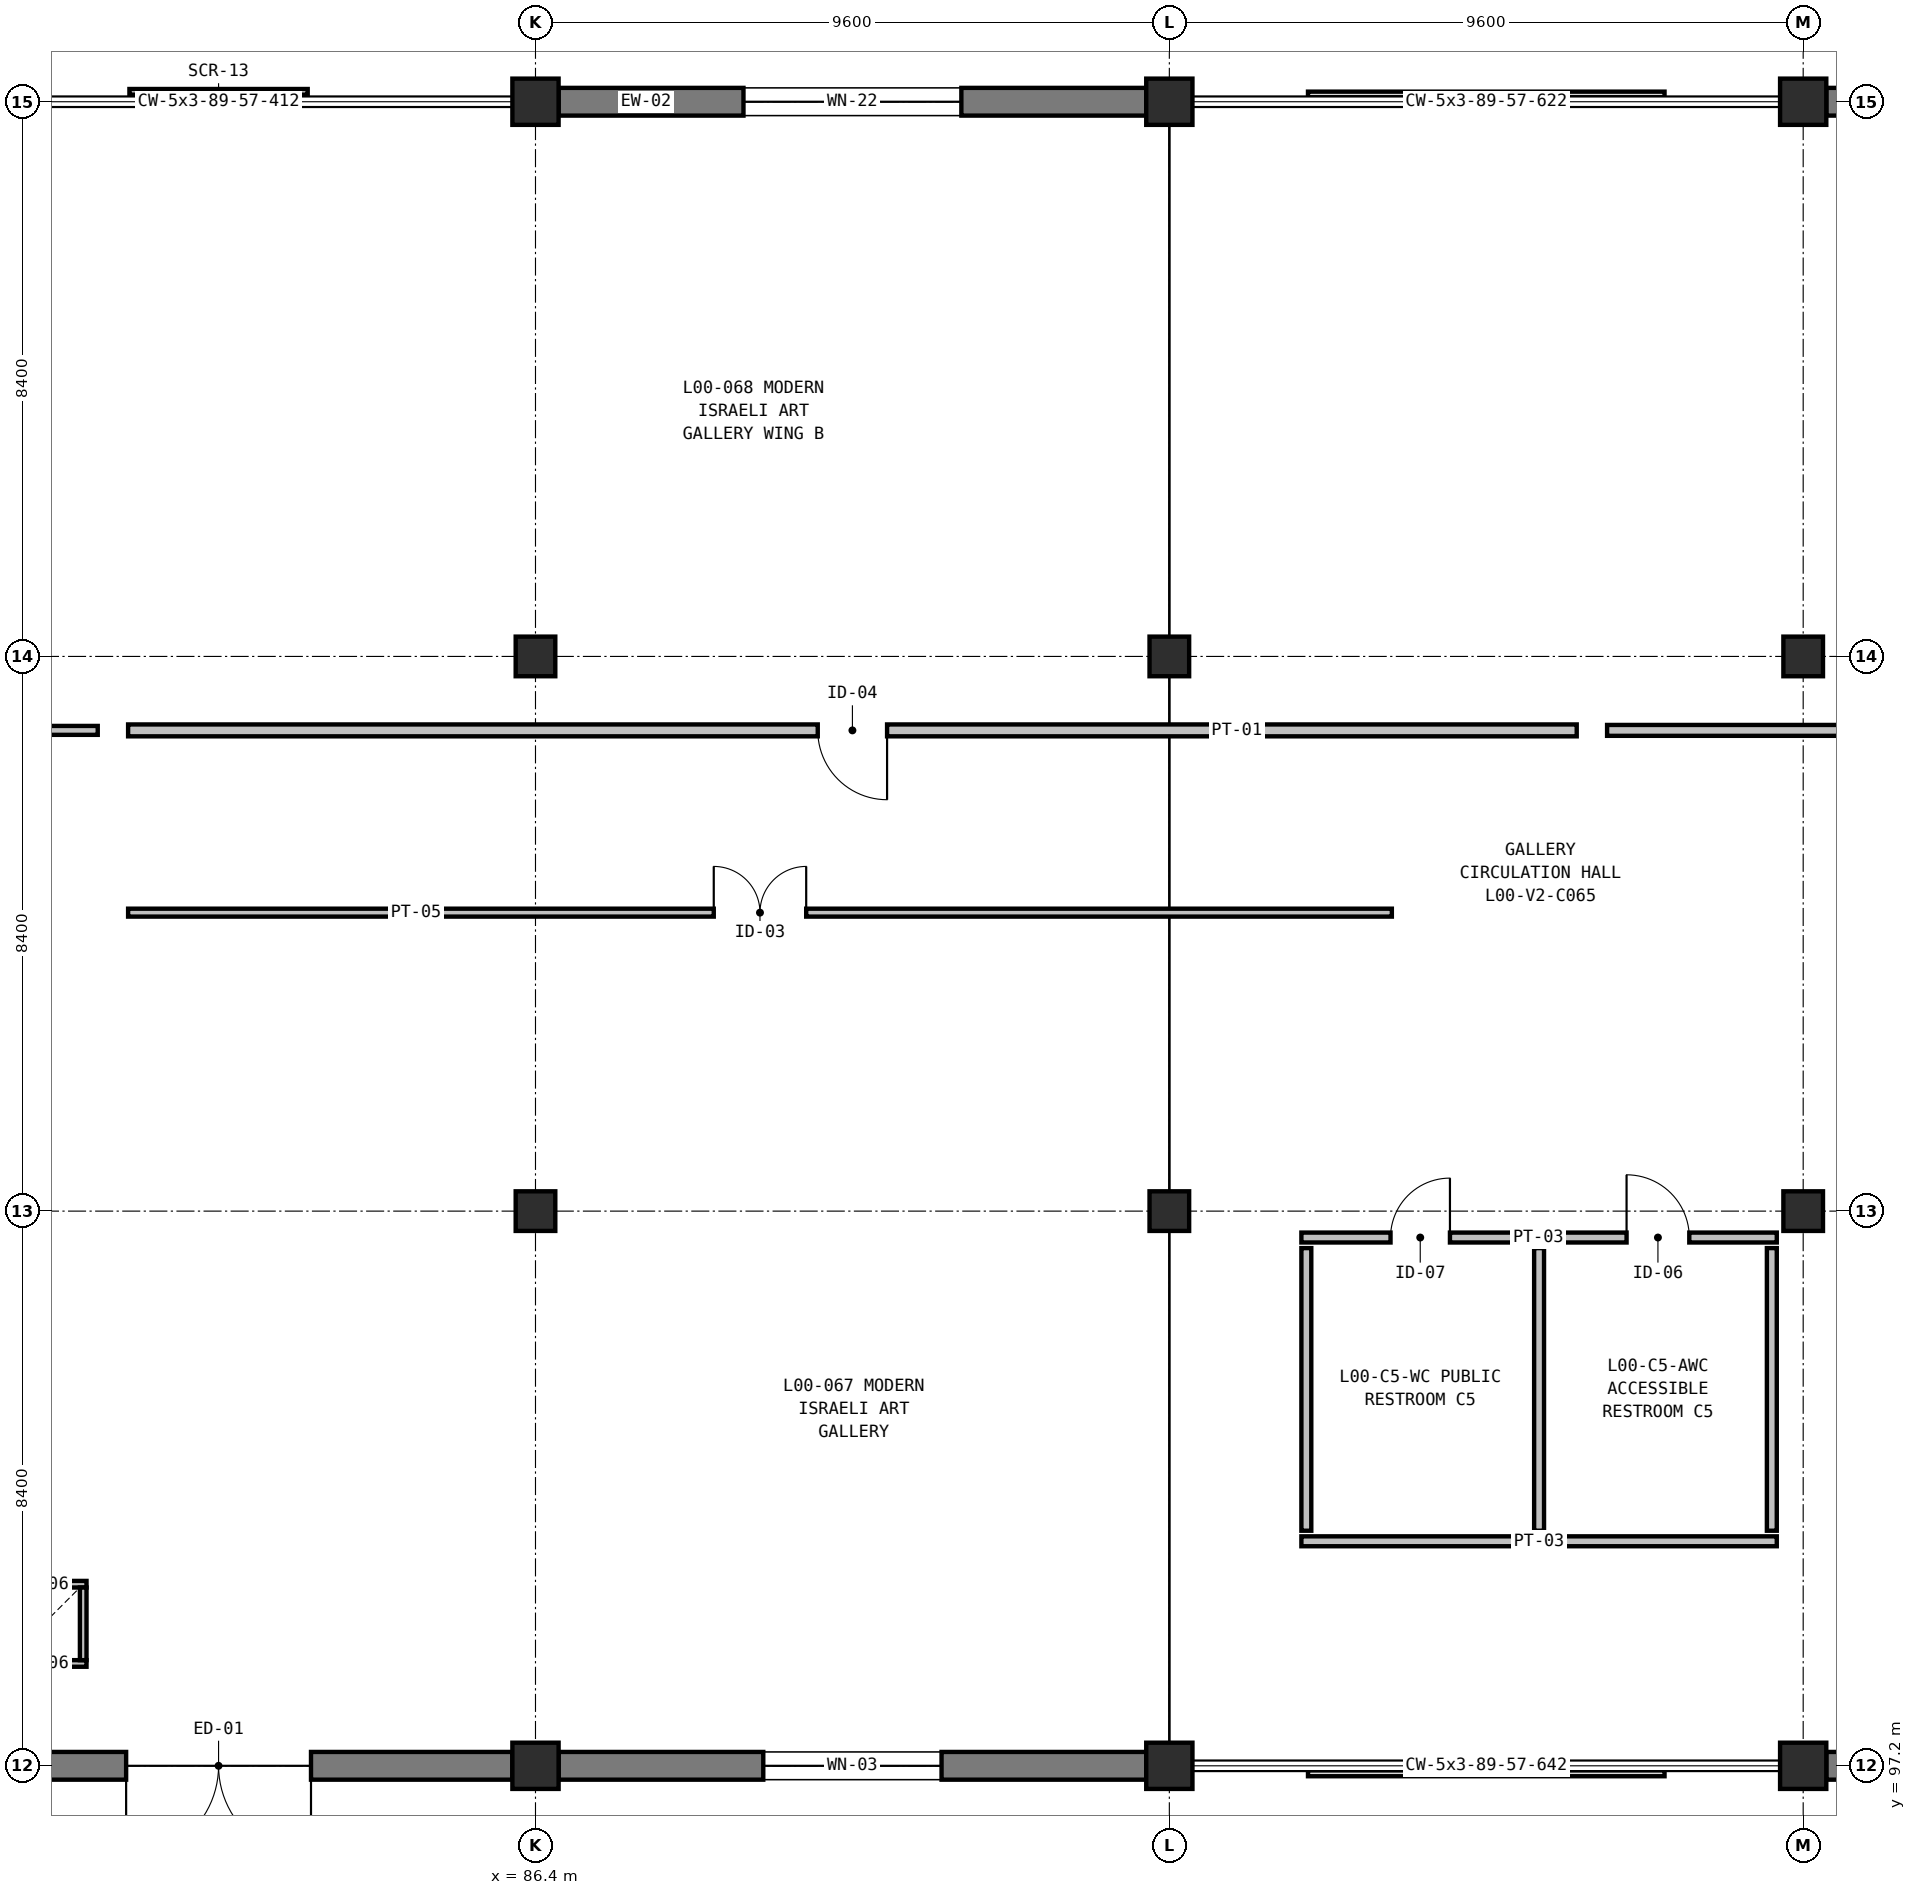
"""IFC4 building model, lengths in metres.
Left out: names, types, materials, properties, quantities, classifications, styles, units other than length and angle.
Written with IfcOpenShell. Run it as: python <this file> out.ifc"""

import sys

from ifc_helpers import new_model, si_unit, direction, frame, frame_2d, origin, origin_2d, place, context, subcontext, project, spatial, rectangle, extrude, element, fill, save


model = new_model("IFC4")
c1 = context("Model", 3, precision=1e-05, world=origin(), true_north=direction((0.0, 1.0)))
c2 = subcontext(c1, "Body", "Model", "MODEL_VIEW")
j1 = project(units=[si_unit("LENGTHUNIT", "METRE"), si_unit("PLANEANGLEUNIT", "RADIAN")], contexts=[c1])
p1 = place(None, origin())
s1 = spatial("IfcSite", under=j1, at=p1, CompositionType="ELEMENT")
p2 = place(p1, origin())
s2 = spatial("IfcBuilding", under=s1, at=p2, CompositionType="ELEMENT")
p3 = place(p2, origin())
s3 = spatial("IfcBuildingStorey", under=s2, at=p3, CompositionType="ELEMENT", Elevation=0.0)
p4 = place(p3, frame((86.4, 97.2, 0.0), z_axis=(0.0, 0.0, 1.0), x_axis=(1.0, 0.0, 0.0)))
e1 = element("IfcColumn", 1, at=p4, inside=s3, PredefinedType="COLUMN", context=c2, shape_type="SweptSolid", body=[
    extrude(rectangle(XDim=0.7, YDim=0.7, at=origin_2d()), origin(), (0.0, 0.0, 1.0), 6.0),
])
for number, where, z_axis, x_axis in (
    (2, (86.4, 105.6, 0.0), (0.0, 0.0, 1.0), (1.0, 0.0, 0.0)),
    (3, (86.4, 114.0, 0.0), (0.0, 0.0, 1.0), (1.0, 0.0, 0.0)),
):
    element("IfcColumn", number, at=place(p3, frame(where, z_axis=z_axis, x_axis=x_axis)), inside=s3, PredefinedType="COLUMN", context=c2, shape_type="SweptSolid", body=[
        extrude(rectangle(XDim=0.6, YDim=0.6, at=origin_2d()), origin(), (0.0, 0.0, 1.0), 6.0),
    ])
for number, where, z_axis, x_axis in (
    (4, (86.4, 122.4, 0.0), (0.0, 0.0, 1.0), (1.0, 0.0, 0.0)),
    (5, (96.0, 97.2, 0.0), (0.0, 0.0, 1.0), (1.0, 0.0, 0.0)),
):
    element("IfcColumn", number, at=place(p3, frame(where, z_axis=z_axis, x_axis=x_axis)), inside=s3, PredefinedType="COLUMN", context=c2, shape_type="SweptSolid", body=[
        extrude(rectangle(XDim=0.7, YDim=0.7, at=origin_2d()), origin(), (0.0, 0.0, 1.0), 6.0),
    ])
for number, where, z_axis, x_axis in (
    (6, (96.0, 105.6, 0.0), (0.0, 0.0, 1.0), (1.0, 0.0, 0.0)),
    (7, (96.0, 114.0, 0.0), (0.0, 0.0, 1.0), (1.0, 0.0, 0.0)),
):
    element("IfcColumn", number, at=place(p3, frame(where, z_axis=z_axis, x_axis=x_axis)), inside=s3, PredefinedType="COLUMN", context=c2, shape_type="SweptSolid", body=[
        extrude(rectangle(XDim=0.6, YDim=0.6, at=origin_2d()), origin(), (0.0, 0.0, 1.0), 6.0),
    ])
for number, where, z_axis, x_axis in (
    (8, (96.0, 122.4, 0.0), (0.0, 0.0, 1.0), (1.0, 0.0, 0.0)),
    (9, (105.6, 97.2, 0.0), (0.0, 0.0, 1.0), (1.0, 0.0, 0.0)),
):
    element("IfcColumn", number, at=place(p3, frame(where, z_axis=z_axis, x_axis=x_axis)), inside=s3, PredefinedType="COLUMN", context=c2, shape_type="SweptSolid", body=[
        extrude(rectangle(XDim=0.7, YDim=0.7, at=origin_2d()), origin(), (0.0, 0.0, 1.0), 6.0),
    ])
for number, where, z_axis, x_axis in (
    (10, (105.6, 105.6, 0.0), (0.0, 0.0, 1.0), (1.0, 0.0, 0.0)),
    (11, (105.6, 114.0, 0.0), (0.0, 0.0, 1.0), (1.0, 0.0, 0.0)),
):
    element("IfcColumn", number, at=place(p3, frame(where, z_axis=z_axis, x_axis=x_axis)), inside=s3, PredefinedType="COLUMN", context=c2, shape_type="SweptSolid", body=[
        extrude(rectangle(XDim=0.6, YDim=0.6, at=origin_2d()), origin(), (0.0, 0.0, 1.0), 6.0),
    ])
p5 = place(p3, frame((105.6, 122.4, 0.0), z_axis=(0.0, 0.0, 1.0), x_axis=(1.0, 0.0, 0.0)))
e12 = element("IfcColumn", 12, at=p5, inside=s3, PredefinedType="COLUMN", context=c2, shape_type="SweptSolid", body=[
    extrude(rectangle(XDim=0.7, YDim=0.7, at=origin_2d()), origin(), (0.0, 0.0, 1.0), 6.0),
])
p6 = place(p3, frame((86.75, 122.4, 0.0), z_axis=(0.0, 0.0, 1.0), x_axis=(1.0, 0.0, 0.0)))
e13 = element("IfcWall", 13, at=p6, inside=s3, PredefinedType="SOLIDWALL", context=c2, shape_type="SweptSolid", body=[
    extrude(rectangle(XDim=8.9, YDim=0.42, at=frame_2d((4.45, 0.0))), origin(), (0.0, 0.0, 1.0), 5.68),
])
p7 = place(p6, frame((2.8, 0.0, 0.9)))
e14 = element("IfcOpeningElement", 14, at=p7, cuts=e13, PredefinedType="OPENING", context=c2, shape_type="SweptSolid", body=[
    extrude(rectangle(XDim=3.3, YDim=2.3, at=frame_2d((1.65, 1.15))), frame((0.0, 0.22, 0.0), z_axis=(0.0, -1.0, 0.0), x_axis=(1.0, 0.0, 0.0)), (0.0, 0.0, 1.0), 0.44),
])
p8 = place(p3, frame((105.95, 122.4, 0.0), z_axis=(0.0, 0.0, 1.0), x_axis=(1.0, 0.0, 0.0)))
e15 = element("IfcWall", 15, at=p8, inside=s3, PredefinedType="SOLIDWALL", context=c2, shape_type="SweptSolid", body=[
    extrude(rectangle(XDim=8.9, YDim=0.42, at=frame_2d((4.45, 0.0))), origin(), (0.0, 0.0, 1.0), 5.68),
])
p9 = place(p8, frame((3.55, 0.0, 0.9)))
e16 = element("IfcOpeningElement", 16, at=p9, cuts=e15, PredefinedType="OPENING", context=c2, shape_type="SweptSolid", body=[
    extrude(rectangle(XDim=1.8, YDim=2.4, at=frame_2d((0.9, 1.2))), frame((0.0, 0.22, 0.0), z_axis=(0.0, -1.0, 0.0), x_axis=(1.0, 0.0, 0.0)), (0.0, 0.0, 1.0), 0.44),
])
p10 = place(p3, frame((114.85, 97.2, 0.0), z_axis=(0.0, 0.0, 1.0), x_axis=(-1.0, 0.0, 0.0)))
e17 = element("IfcWall", 17, at=p10, inside=s3, PredefinedType="SOLIDWALL", context=c2, shape_type="SweptSolid", body=[
    extrude(rectangle(XDim=8.9, YDim=0.42, at=frame_2d((4.45, 0.0))), origin(), (0.0, 0.0, 1.0), 5.68),
])
p11 = place(p10, frame((3.25, 0.0, 0.9)))
e18 = element("IfcOpeningElement", 18, at=p11, cuts=e17, PredefinedType="OPENING", context=c2, shape_type="SweptSolid", body=[
    extrude(rectangle(XDim=2.4, YDim=2.4, at=frame_2d((1.2, 1.2))), frame((0.0, 0.22, 0.0), z_axis=(0.0, -1.0, 0.0), x_axis=(1.0, 0.0, 0.0)), (0.0, 0.0, 1.0), 0.44),
])
p12 = place(p3, frame((95.65, 97.2, 0.0), z_axis=(0.0, 0.0, 1.0), x_axis=(-1.0, 0.0, 0.0)))
e19 = element("IfcWall", 19, at=p12, inside=s3, PredefinedType="SOLIDWALL", context=c2, shape_type="SweptSolid", body=[
    extrude(rectangle(XDim=8.9, YDim=0.42, at=frame_2d((4.45, 0.0))), origin(), (0.0, 0.0, 1.0), 5.68),
])
p13 = place(p12, frame((3.1, 0.0, 0.9)))
e20 = element("IfcOpeningElement", 20, at=p13, cuts=e19, PredefinedType="OPENING", context=c2, shape_type="SweptSolid", body=[
    extrude(rectangle(XDim=2.7, YDim=2.4, at=frame_2d((1.35, 1.2))), frame((0.0, 0.22, 0.0), z_axis=(0.0, -1.0, 0.0), x_axis=(1.0, 0.0, 0.0)), (0.0, 0.0, 1.0), 0.44),
])
p14 = place(p3, frame((86.05, 97.2, 0.0), z_axis=(0.0, 0.0, 1.0), x_axis=(-1.0, 0.0, 0.0)))
e21 = element("IfcWall", 21, at=p14, inside=s3, PredefinedType="SOLIDWALL", context=c2, shape_type="SweptSolid", body=[
    extrude(rectangle(XDim=8.9, YDim=0.42, at=frame_2d((4.45, 0.0))), origin(), (0.0, 0.0, 1.0), 5.68),
])
p15 = place(p14, frame((3.05, 0.0, 0.0)))
e22 = element("IfcOpeningElement", 22, at=p15, cuts=e21, PredefinedType="OPENING", context=c2, shape_type="SweptSolid", body=[
    extrude(rectangle(XDim=2.8, YDim=2.5, at=frame_2d((1.4, 1.25))), frame((0.0, 0.22, 0.0), z_axis=(0.0, -1.0, 0.0), x_axis=(1.0, 0.0, 0.0)), (0.0, 0.0, 1.0), 0.44),
])
p16 = place(p3, frame((98.0, 105.2, 0.0), z_axis=(0.0, 0.0, 1.0), x_axis=(1.0, 0.0, 0.0)))
e23 = element("IfcWall", 23, at=p16, inside=s3, PredefinedType="PARTITIONING", context=c2, shape_type="SweptSolid", body=[
    extrude(rectangle(XDim=7.2, YDim=0.15, at=frame_2d((3.6, 0.0))), origin(), (0.0, 0.0, 1.0), 5.68),
])
p17 = place(p16, frame((1.35, 0.0, 0.0)))
e24 = element("IfcOpeningElement", 24, at=p17, cuts=e23, PredefinedType="OPENING", context=c2, shape_type="SweptSolid", body=[
    extrude(rectangle(XDim=0.9, YDim=2.1, at=frame_2d((0.45, 1.05))), frame((0.0, 0.085, 0.0), z_axis=(0.0, -1.0, 0.0), x_axis=(1.0, 0.0, 0.0)), (0.0, 0.0, 1.0), 0.17),
])
p18 = place(p16, frame((4.925, 0.0, 0.0)))
e25 = element("IfcOpeningElement", 25, at=p18, cuts=e23, PredefinedType="OPENING", context=c2, shape_type="SweptSolid", body=[
    extrude(rectangle(XDim=0.95, YDim=2.15, at=frame_2d((0.475, 1.075))), frame((0.0, 0.085, 0.0), z_axis=(0.0, -1.0, 0.0), x_axis=(1.0, 0.0, 0.0)), (0.0, 0.0, 1.0), 0.17),
])
p19 = place(p3, frame((98.0, 100.6, 0.0), z_axis=(0.0, 0.0, 1.0), x_axis=(1.0, 0.0, 0.0)))
e26 = element("IfcWall", 26, at=p19, inside=s3, PredefinedType="PARTITIONING", context=c2, shape_type="SweptSolid", body=[
    extrude(rectangle(XDim=7.2, YDim=0.15, at=frame_2d((3.6, 0.0))), origin(), (0.0, 0.0, 1.0), 5.68),
])
for number, where, z_axis, x_axis in (
    (27, (98.075, 100.76, 0.0), (0.0, 0.0, 1.0), (0.0, 1.0, 0.0)),
    (28, (101.6, 100.76, 0.0), (0.0, 0.0, 1.0), (0.0, 1.0, 0.0)),
    (29, (105.125, 100.76, 0.0), (0.0, 0.0, 1.0), (0.0, 1.0, 0.0)),
):
    element("IfcWall", number, at=place(p3, frame(where, z_axis=z_axis, x_axis=x_axis)), inside=s3, PredefinedType="PARTITIONING", context=c2, shape_type="SweptSolid", body=[
        extrude(rectangle(XDim=4.28, YDim=0.15, at=frame_2d((2.14, 0.0))), origin(), (0.0, 0.0, 1.0), 5.055),
    ])
for number, where, z_axis, x_axis in (
    (30, (78.3, 99.95, 0.0), (0.0, 0.0, 1.0), (1.0, 0.0, 0.0)),
    (31, (79.6, 98.75, 0.0), (0.0, 0.0, 1.0), (-1.0, 0.0, 0.0)),
):
    element("IfcWall", number, at=place(p3, frame(where, z_axis=z_axis, x_axis=x_axis)), inside=s3, PredefinedType="PARTITIONING", context=c2, shape_type="SweptSolid", body=[
        extrude(rectangle(XDim=1.3, YDim=0.1, at=frame_2d((0.65, 0.0))), origin(), (0.0, 0.0, 1.0), 5.68),
    ])
p20 = place(p3, frame((79.55, 99.9, 0.0), z_axis=(0.0, 0.0, 1.0), x_axis=(0.0, -1.0, 0.0)))
e32 = element("IfcWall", 32, at=p20, inside=s3, PredefinedType="PARTITIONING", context=c2, shape_type="SweptSolid", body=[
    extrude(rectangle(XDim=1.1, YDim=0.1, at=frame_2d((0.55, 0.0))), origin(), (0.0, 0.0, 1.0), 5.68),
])
p21 = place(p3, frame((79.77, 112.88, 0.0), z_axis=(0.0, 0.0, 1.0), x_axis=(-1.0, 0.0, 0.0)))
e33 = element("IfcWall", 33, at=p21, inside=s3, PredefinedType="PARTITIONING", context=c2, shape_type="SweptSolid", body=[
    extrude(rectangle(XDim=21.62, YDim=0.135, at=frame_2d((10.81, 0.0))), origin(), (0.0, 0.0, 1.0), 4.955),
])
p22 = place(p21, frame((10.01, 0.0, 0.0)))
e34 = element("IfcOpeningElement", 34, at=p22, cuts=e33, PredefinedType="OPENING", context=c2, shape_type="SweptSolid", body=[
    extrude(rectangle(XDim=1.6, YDim=2.35, at=frame_2d((0.8, 1.175))), frame((0.0, 0.077, 0.0), z_axis=(0.0, -1.0, 0.0), x_axis=(1.0, 0.0, 0.0)), (0.0, 0.0, 1.0), 0.155),
])
p23 = place(p3, frame((80.23, 110.12, 0.0), z_axis=(0.0, 0.0, 1.0), x_axis=(1.0, 0.0, 0.0)))
e35 = element("IfcWall", 35, at=p23, inside=s3, PredefinedType="PARTITIONING", context=c2, shape_type="SweptSolid", body=[
    extrude(rectangle(XDim=19.14, YDim=0.12, at=frame_2d((9.57, 0.0))), origin(), (0.0, 0.0, 1.0), 4.955),
])
p24 = place(p23, frame((8.87, 0.0, 0.0)))
e36 = element("IfcOpeningElement", 36, at=p24, cuts=e35, PredefinedType="OPENING", context=c2, shape_type="SweptSolid", body=[
    extrude(rectangle(XDim=1.4, YDim=2.3, at=frame_2d((0.7, 1.15))), frame((0.0, 0.07, 0.0), z_axis=(0.0, -1.0, 0.0), x_axis=(1.0, 0.0, 0.0)), (0.0, 0.0, 1.0), 0.14),
])
p25 = place(p3, frame((102.17, 112.88, 0.0), z_axis=(0.0, 0.0, 1.0), x_axis=(-1.0, 0.0, 0.0)))
e37 = element("IfcWall", 37, at=p25, inside=s3, PredefinedType="PARTITIONING", context=c2, shape_type="SweptSolid", body=[
    extrude(rectangle(XDim=21.94, YDim=0.18, at=frame_2d((10.97, 0.0))), origin(), (0.0, 0.0, 1.0), 4.955),
])
p26 = place(p25, frame((10.445, 0.0, 0.0)))
e38 = element("IfcOpeningElement", 38, at=p26, cuts=e37, PredefinedType="OPENING", context=c2, shape_type="SweptSolid", body=[
    extrude(rectangle(XDim=1.05, YDim=2.2, at=frame_2d((0.525, 1.1))), frame((0.0, 0.1, 0.0), z_axis=(0.0, -1.0, 0.0), x_axis=(1.0, 0.0, 0.0)), (0.0, 0.0, 1.0), 0.2),
])
p27 = place(p3, frame((124.25, 112.88, 0.0), z_axis=(0.0, 0.0, 1.0), x_axis=(-1.0, 0.0, 0.0)))
e39 = element("IfcWall", 39, at=p27, inside=s3, PredefinedType="PARTITIONING", context=c2, shape_type="SweptSolid", body=[
    extrude(rectangle(XDim=21.62, YDim=0.165, at=frame_2d((10.81, 0.0))), origin(), (0.0, 0.0, 1.0), 4.955),
])
p28 = place(p27, frame((10.31, 0.0, 0.0)))
e40 = element("IfcOpeningElement", 40, at=p28, cuts=e39, PredefinedType="OPENING", context=c2, shape_type="SweptSolid", body=[
    extrude(rectangle(XDim=1.0, YDim=2.15, at=frame_2d((0.5, 1.075))), frame((0.0, 0.093, 0.0), z_axis=(0.0, -1.0, 0.0), x_axis=(1.0, 0.0, 0.0)), (0.0, 0.0, 1.0), 0.185),
])
p29 = place(p7, origin())
e41 = element("IfcWindow", 41, at=p29, inside=s3, PartitioningType="SINGLE_PANEL", PredefinedType="WINDOW", context=c2, shape_type="SweptSolid", body=[
    extrude(rectangle(XDim=3.3, YDim=2.3, at=frame_2d((1.65, 1.15))), frame((0.0, 0.03, 0.0), z_axis=(0.0, -1.0, 0.0), x_axis=(1.0, 0.0, 0.0)), (0.0, 0.0, 1.0), 0.06),
])
fill(e14, e41)
p30 = place(p13, origin())
e42 = element("IfcWindow", 42, at=p30, inside=s3, PartitioningType="SINGLE_PANEL", PredefinedType="WINDOW", context=c2, shape_type="SweptSolid", body=[
    extrude(rectangle(XDim=2.7, YDim=2.4, at=frame_2d((1.35, 1.2))), frame((0.0, 0.03, 0.0), z_axis=(0.0, -1.0, 0.0), x_axis=(1.0, 0.0, 0.0)), (0.0, 0.0, 1.0), 0.06),
])
fill(e20, e42)
p31 = place(p15, origin())
e43 = element("IfcDoor", 43, at=p31, inside=s3, OperationType="DOUBLE_DOOR_SINGLE_SWING", PredefinedType="DOOR", context=c2, shape_type="SweptSolid", body=[
    extrude(rectangle(XDim=2.8, YDim=2.5, at=frame_2d((1.4, 1.25))), frame((0.0, 0.025, 0.0), z_axis=(0.0, -1.0, 0.0), x_axis=(1.0, 0.0, 0.0)), (0.0, 0.0, 1.0), 0.05),
])
fill(e22, e43)
p32 = place(p17, origin())
e44 = element("IfcDoor", 44, at=p32, inside=s3, OperationType="SINGLE_SWING_RIGHT", PredefinedType="DOOR", context=c2, shape_type="SweptSolid", body=[
    extrude(rectangle(XDim=0.9, YDim=2.1, at=frame_2d((0.45, 1.05))), frame((0.0, 0.025, 0.0), z_axis=(0.0, -1.0, 0.0), x_axis=(1.0, 0.0, 0.0)), (0.0, 0.0, 1.0), 0.05),
])
fill(e24, e44)
p33 = place(p18, origin())
e45 = element("IfcDoor", 45, at=p33, inside=s3, OperationType="SINGLE_SWING_LEFT", PredefinedType="DOOR", context=c2, shape_type="SweptSolid", body=[
    extrude(rectangle(XDim=0.95, YDim=2.15, at=frame_2d((0.475, 1.075))), frame((0.0, 0.025, 0.0), z_axis=(0.0, -1.0, 0.0), x_axis=(1.0, 0.0, 0.0)), (0.0, 0.0, 1.0), 0.05),
])
fill(e25, e45)
p34 = place(p24, origin())
e46 = element("IfcDoor", 46, at=p34, inside=s3, OperationType="DOUBLE_DOOR_SINGLE_SWING", PredefinedType="DOOR", context=c2, shape_type="SweptSolid", body=[
    extrude(rectangle(XDim=1.4, YDim=2.3, at=frame_2d((0.7, 1.15))), frame((0.0, 0.025, 0.0), z_axis=(0.0, -1.0, 0.0), x_axis=(1.0, 0.0, 0.0)), (0.0, 0.0, 1.0), 0.05),
])
fill(e36, e46)
p35 = place(p26, origin())
e47 = element("IfcDoor", 47, at=p35, inside=s3, OperationType="SINGLE_SWING_LEFT", PredefinedType="DOOR", context=c2, shape_type="SweptSolid", body=[
    extrude(rectangle(XDim=1.05, YDim=2.2, at=frame_2d((0.525, 1.1))), frame((0.0, 0.025, 0.0), z_axis=(0.0, -1.0, 0.0), x_axis=(1.0, 0.0, 0.0)), (0.0, 0.0, 1.0), 0.05),
])
fill(e38, e47)
save(model, sys.argv[1])
